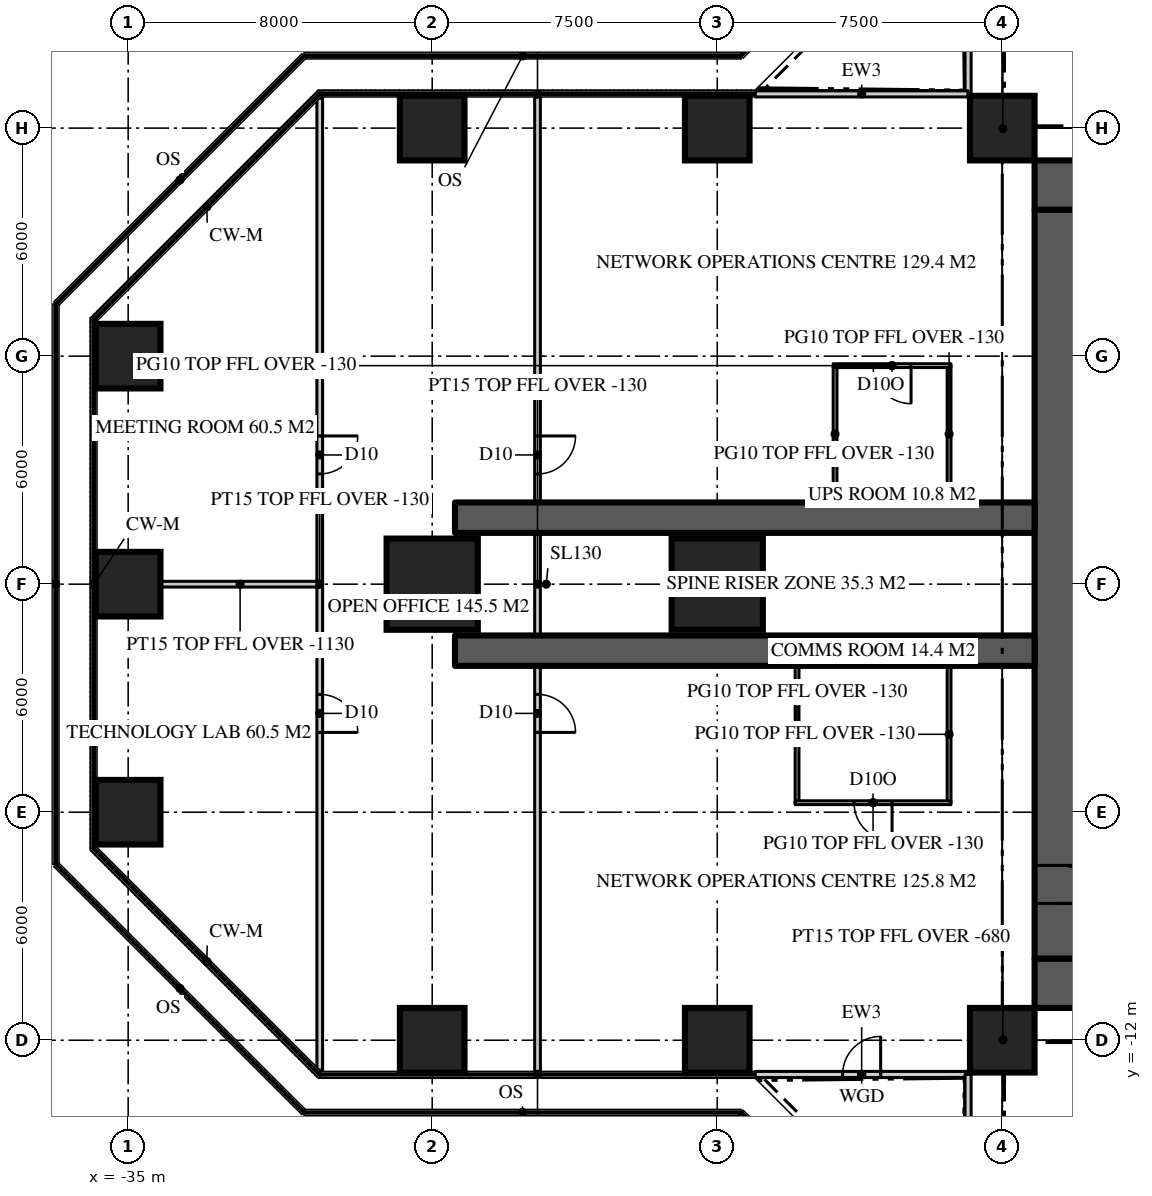
"""IFC4 building model, lengths in metres.
Left out: names, types, materials, properties, quantities, classifications, styles, units other than length and angle.
Written with IfcOpenShell. Run it as: python <this file> out.ifc"""

import sys

from ifc_helpers import new_model, si_unit, direction, frame, frame_2d, origin, origin_2d, place, context, subcontext, project, spatial, rectangle, extrude, element, fill, save


model = new_model("IFC4")
c1 = context("Model", 3, precision=1e-05, world=origin(), true_north=direction((0.0, 1.0)))
c2 = subcontext(c1, "Body", "Model", "MODEL_VIEW")
j1 = project(units=[si_unit("LENGTHUNIT", "METRE"), si_unit("PLANEANGLEUNIT", "RADIAN")], contexts=[c1])
p1 = place(None, origin())
s1 = spatial("IfcSite", under=j1, at=p1, CompositionType="ELEMENT")
p2 = place(p1, origin())
s2 = spatial("IfcBuilding", under=s1, at=p2, CompositionType="ELEMENT")
p3 = place(p2, frame((0.0, 0.0, 151.5)))
s3 = spatial("IfcBuildingStorey", under=s2, at=p3, CompositionType="ELEMENT", Elevation=151.5)
p4 = place(p3, frame((-11.15, 10.5, 0.0), z_axis=(0.0, 0.0, 1.0), x_axis=(1.0, 0.0, 0.0)))
e1 = element("IfcWall", 1, at=p4, inside=s3, PredefinedType="SHEAR", context=c2, shape_type="SweptSolid", body=[
    extrude(rectangle(XDim=22.3, YDim=1.3, at=frame_2d((11.15, 0.0))), origin(), (0.0, 0.0, 1.0), 3.9),
])
p5 = place(p4, frame((4.25, 0.0, 0.0)))
e2 = element("IfcOpeningElement", 2, at=p5, cuts=e1, PredefinedType="OPENING", context=c2, shape_type="SweptSolid", body=[
    extrude(rectangle(XDim=1.8, YDim=2.2, at=frame_2d((0.9, 1.1))), frame((0.0, 0.66, 0.0), z_axis=(0.0, -1.0, 0.0), x_axis=(1.0, 0.0, 0.0)), (0.0, 0.0, 1.0), 1.32),
])
p6 = place(p4, frame((16.25, 0.0, 0.0)))
e3 = element("IfcOpeningElement", 3, at=p6, cuts=e1, PredefinedType="OPENING", context=c2, shape_type="SweptSolid", body=[
    extrude(rectangle(XDim=1.8, YDim=2.2, at=frame_2d((0.9, 1.1))), frame((0.0, 0.66, 0.0), z_axis=(0.0, -1.0, 0.0), x_axis=(1.0, 0.0, 0.0)), (0.0, 0.0, 1.0), 1.32),
])
p7 = place(p3, frame((11.15, -10.5, 0.0), z_axis=(0.0, 0.0, 1.0), x_axis=(-1.0, 0.0, 0.0)))
e4 = element("IfcWall", 4, at=p7, inside=s3, PredefinedType="SHEAR", context=c2, shape_type="SweptSolid", body=[
    extrude(rectangle(XDim=22.3, YDim=1.3, at=frame_2d((11.15, 0.0))), origin(), (0.0, 0.0, 1.0), 3.9),
])
p8 = place(p7, frame((16.25, 0.0, 0.0)))
e5 = element("IfcOpeningElement", 5, at=p8, cuts=e4, PredefinedType="OPENING", context=c2, shape_type="SweptSolid", body=[
    extrude(rectangle(XDim=1.8, YDim=2.2, at=frame_2d((0.9, 1.1))), frame((0.0, 0.66, 0.0), z_axis=(0.0, -1.0, 0.0), x_axis=(1.0, 0.0, 0.0)), (0.0, 0.0, 1.0), 1.32),
])
p9 = place(p7, frame((4.25, 0.0, 0.0)))
e6 = element("IfcOpeningElement", 6, at=p9, cuts=e4, PredefinedType="OPENING", context=c2, shape_type="SweptSolid", body=[
    extrude(rectangle(XDim=1.8, YDim=2.2, at=frame_2d((0.9, 1.1))), frame((0.0, 0.66, 0.0), z_axis=(0.0, -1.0, 0.0), x_axis=(1.0, 0.0, 0.0)), (0.0, 0.0, 1.0), 1.32),
])
p10 = place(p3, frame((-10.5, 9.85, 0.0), z_axis=(0.0, 0.0, 1.0), x_axis=(0.0, -1.0, 0.0)))
e7 = element("IfcWall", 7, at=p10, inside=s3, PredefinedType="SHEAR", context=c2, shape_type="SweptSolid", body=[
    extrude(rectangle(XDim=19.7, YDim=1.3, at=frame_2d((9.85, 0.0))), origin(), (0.0, 0.0, 1.0), 3.9),
])
p11 = place(p10, frame((17.25, 0.0, 0.0)))
e8 = element("IfcOpeningElement", 8, at=p11, cuts=e7, PredefinedType="OPENING", context=c2, shape_type="SweptSolid", body=[
    extrude(rectangle(XDim=1.0, YDim=2.2, at=frame_2d((0.5, 1.1))), frame((0.0, 0.66, 0.0), z_axis=(0.0, -1.0, 0.0), x_axis=(1.0, 0.0, 0.0)), (0.0, 0.0, 1.0), 1.32),
])
for number, where, z_axis, x_axis in (
    (9, (-11.15, 1.75, 0.0), (0.0, 0.0, 1.0), (-1.0, 0.0, 0.0)),
    (10, (-11.15, -1.75, 0.0), (0.0, 0.0, 1.0), (-1.0, 0.0, 0.0)),
):
    element("IfcWall", number, at=place(p3, frame(where, z_axis=z_axis, x_axis=x_axis)), inside=s3, PredefinedType="SHEAR", context=c2, shape_type="SweptSolid", body=[
        extrude(rectangle(XDim=15.25, YDim=0.8, at=frame_2d((7.625, 0.0))), origin(), (0.0, 0.0, 1.0), 3.9),
    ])
for number, where, z_axis, x_axis in (
    (11, (-27.0, -12.0, 0.0), (0.0, 0.0, 1.0), (1.0, 0.0, 0.0)),
    (12, (-19.5, -12.0, 0.0), (0.0, 0.0, 1.0), (1.0, 0.0, 0.0)),
    (13, (-12.0, -12.0, 0.0), (0.0, 0.0, 1.0), (1.0, 0.0, 0.0)),
    (14, (-35.0, -6.0, 0.0), (0.0, 0.0, 1.0), (1.0, 0.0, 0.0)),
    (15, (-35.0, 0.0, 0.0), (0.0, 0.0, 1.0), (1.0, 0.0, 0.0)),
):
    element("IfcColumn", number, at=place(p3, frame(where, z_axis=z_axis, x_axis=x_axis)), inside=s3, PredefinedType="COLUMN", context=c2, shape_type="SweptSolid", body=[
        extrude(rectangle(XDim=1.7, YDim=1.7, at=origin_2d()), origin(), (0.0, 0.0, 1.0), 3.9),
    ])
for number, where, z_axis, x_axis in (
    (16, (-27.0, 0.0, 0.0), (0.0, 0.0, 1.0), (1.0, 0.0, 0.0)),
    (17, (-19.5, 0.0, 0.0), (0.0, 0.0, 1.0), (1.0, 0.0, 0.0)),
):
    element("IfcColumn", number, at=place(p3, frame(where, z_axis=z_axis, x_axis=x_axis)), inside=s3, PredefinedType="COLUMN", context=c2, shape_type="SweptSolid", body=[
        extrude(rectangle(XDim=2.4, YDim=2.4, at=origin_2d()), origin(), (0.0, 0.0, 1.0), 3.9),
    ])
for number, where, z_axis, x_axis in (
    (18, (-35.0, 6.0, 0.0), (0.0, 0.0, 1.0), (1.0, 0.0, 0.0)),
    (19, (-27.0, 12.0, 0.0), (0.0, 0.0, 1.0), (1.0, 0.0, 0.0)),
    (20, (-19.5, 12.0, 0.0), (0.0, 0.0, 1.0), (1.0, 0.0, 0.0)),
    (21, (-12.0, 12.0, 0.0), (0.0, 0.0, 1.0), (1.0, 0.0, 0.0)),
):
    element("IfcColumn", number, at=place(p3, frame(where, z_axis=z_axis, x_axis=x_axis)), inside=s3, PredefinedType="COLUMN", context=c2, shape_type="SweptSolid", body=[
        extrude(rectangle(XDim=1.7, YDim=1.7, at=origin_2d()), origin(), (0.0, 0.0, 1.0), 3.9),
    ])
p12 = place(p3, frame((-12.9, 18.5, 0.0), z_axis=(0.0, 0.0, 1.0), x_axis=(0.0, -1.0, 0.0)))
e22 = element("IfcWall", 22, at=p12, inside=s3, PredefinedType="SOLIDWALL", context=c2, shape_type="SweptSolid", body=[
    extrude(rectangle(XDim=5.6, YDim=0.16, at=frame_2d((2.8, 0.0))), origin(), (0.0, 0.0, 1.0), 3.77),
])
p13 = place(p12, frame((2.3, 0.0, 0.0)))
e23 = element("IfcOpeningElement", 23, at=p13, cuts=e22, PredefinedType="OPENING", context=c2, shape_type="SweptSolid", body=[
    extrude(rectangle(XDim=1.0, YDim=2.2, at=frame_2d((0.5, 1.1))), frame((0.0, 0.09, 0.0), z_axis=(0.0, -1.0, 0.0), x_axis=(1.0, 0.0, 0.0)), (0.0, 0.0, 1.0), 0.18),
])
p14 = place(p3, frame((-12.9, 12.9, 0.0), z_axis=(0.0, 0.0, 1.0), x_axis=(-1.0, 0.0, 0.0)))
e24 = element("IfcWall", 24, at=p14, inside=s3, PredefinedType="SOLIDWALL", context=c2, shape_type="SweptSolid", body=[
    extrude(rectangle(XDim=5.6, YDim=0.16, at=frame_2d((2.8, 0.0))), origin(), (0.0, 0.0, 1.0), 3.77),
])
p15 = place(p3, frame((-18.5, -12.9, 0.0), z_axis=(0.0, 0.0, 1.0), x_axis=(1.0, 0.0, 0.0)))
e25 = element("IfcWall", 25, at=p15, inside=s3, PredefinedType="SOLIDWALL", context=c2, shape_type="SweptSolid", body=[
    extrude(rectangle(XDim=5.6, YDim=0.16, at=frame_2d((2.8, 0.0))), origin(), (0.0, 0.0, 1.0), 3.77),
])
p16 = place(p15, frame((2.3, 0.0, 0.0)))
e26 = element("IfcOpeningElement", 26, at=p16, cuts=e25, PredefinedType="OPENING", context=c2, shape_type="SweptSolid", body=[
    extrude(rectangle(XDim=1.0, YDim=2.2, at=frame_2d((0.5, 1.1))), frame((0.0, 0.09, 0.0), z_axis=(0.0, -1.0, 0.0), x_axis=(1.0, 0.0, 0.0)), (0.0, 0.0, 1.0), 0.18),
])
p17 = place(p3, frame((-12.9, -12.9, 0.0), z_axis=(0.0, 0.0, 1.0), x_axis=(0.0, -1.0, 0.0)))
e27 = element("IfcWall", 27, at=p17, inside=s3, PredefinedType="SOLIDWALL", context=c2, shape_type="SweptSolid", body=[
    extrude(rectangle(XDim=5.6, YDim=0.16, at=frame_2d((2.8, 0.0))), origin(), (0.0, 0.0, 1.0), 3.77),
])
p18 = place(p3, frame((-24.229, 12.82, 0.0), z_axis=(0.0, 0.0, 1.0), x_axis=(0.0, -1.0, 0.0)))
e28 = element("IfcWall", 28, at=p18, inside=s3, PredefinedType="PARTITIONING", context=c2, shape_type="SweptSolid", body=[
    extrude(rectangle(XDim=25.64, YDim=0.15, at=frame_2d((12.82, 0.0))), origin(), (0.0, 0.0, 1.0), 3.77),
])
p19 = place(p18, frame((15.72, 0.0, 0.0)))
e29 = element("IfcOpeningElement", 29, at=p19, cuts=e28, PredefinedType="OPENING", context=c2, shape_type="SweptSolid", body=[
    extrude(rectangle(XDim=1.0, YDim=2.2, at=frame_2d((0.5, 1.1))), frame((0.0, 0.085, 0.0), z_axis=(0.0, -1.0, 0.0), x_axis=(1.0, 0.0, 0.0)), (0.0, 0.0, 1.0), 0.17),
])
p20 = place(p18, frame((8.92, 0.0, 0.0)))
e30 = element("IfcOpeningElement", 30, at=p20, cuts=e28, PredefinedType="OPENING", context=c2, shape_type="SweptSolid", body=[
    extrude(rectangle(XDim=1.0, YDim=2.2, at=frame_2d((0.5, 1.1))), frame((0.0, 0.085, 0.0), z_axis=(0.0, -1.0, 0.0), x_axis=(1.0, 0.0, 0.0)), (0.0, 0.0, 1.0), 0.17),
])
p21 = place(p3, frame((-29.959, 12.786, 0.0), z_axis=(0.0, 0.0, 1.0), x_axis=(0.0, -1.0, 0.0)))
e31 = element("IfcWall", 31, at=p21, inside=s3, PredefinedType="PARTITIONING", context=c2, shape_type="SweptSolid", body=[
    extrude(rectangle(XDim=25.573, YDim=0.15, at=frame_2d((12.786, 0.0))), origin(), (0.0, 0.0, 1.0), 3.77),
])
p22 = place(p21, frame((15.687, 0.0, 0.0)))
e32 = element("IfcOpeningElement", 32, at=p22, cuts=e31, PredefinedType="OPENING", context=c2, shape_type="SweptSolid", body=[
    extrude(rectangle(XDim=1.0, YDim=2.2, at=frame_2d((0.5, 1.1))), frame((0.0, 0.085, 0.0), z_axis=(0.0, -1.0, 0.0), x_axis=(1.0, 0.0, 0.0)), (0.0, 0.0, 1.0), 0.17),
])
p23 = place(p21, frame((8.886, 0.0, 0.0)))
e33 = element("IfcOpeningElement", 33, at=p23, cuts=e31, PredefinedType="OPENING", context=c2, shape_type="SweptSolid", body=[
    extrude(rectangle(XDim=1.0, YDim=2.2, at=frame_2d((0.5, 1.1))), frame((0.0, 0.085, 0.0), z_axis=(0.0, -1.0, 0.0), x_axis=(1.0, 0.0, 0.0)), (0.0, 0.0, 1.0), 0.17),
])
p24 = place(p3, frame((-29.959, 0.0, 0.0), z_axis=(0.0, 0.0, 1.0), x_axis=(-1.0, 0.0, 0.0)))
e34 = element("IfcWall", 34, at=p24, inside=s3, PredefinedType="PARTITIONING", context=c2, shape_type="SweptSolid", body=[
    extrude(rectangle(XDim=4.191, YDim=0.15, at=frame_2d((2.095, 0.0))), origin(), (0.0, 0.0, 1.0), 2.77),
])
for number, where, z_axis, x_axis in (
    (35, (-13.4, -2.15, 0.0), (0.0, 0.0, 1.0), (0.0, -1.0, 0.0)),
    (36, (-17.4, -2.15, 0.0), (0.0, 0.0, 1.0), (0.0, -1.0, 0.0)),
):
    element("IfcWall", number, at=place(p3, frame(where, z_axis=z_axis, x_axis=x_axis)), inside=s3, PredefinedType="PARTITIONING", context=c2, shape_type="SweptSolid", body=[
        extrude(rectangle(XDim=3.6, YDim=0.1, at=frame_2d((1.8, 0.0))), origin(), (0.0, 0.0, 1.0), 3.77),
    ])
p25 = place(p3, frame((-13.35, -5.75, 0.0), z_axis=(0.0, 0.0, 1.0), x_axis=(-1.0, 0.0, 0.0)))
e37 = element("IfcWall", 37, at=p25, inside=s3, PredefinedType="PARTITIONING", context=c2, shape_type="SweptSolid", body=[
    extrude(rectangle(XDim=4.1, YDim=0.1, at=frame_2d((2.05, 0.0))), origin(), (0.0, 0.0, 1.0), 3.77),
])
p26 = place(p25, frame((1.55, 0.0, 0.0)))
e38 = element("IfcOpeningElement", 38, at=p26, cuts=e37, PredefinedType="OPENING", context=c2, shape_type="SweptSolid", body=[
    extrude(rectangle(XDim=1.0, YDim=2.2, at=frame_2d((0.5, 1.1))), frame((0.0, 0.06, 0.0), z_axis=(0.0, -1.0, 0.0), x_axis=(1.0, 0.0, 0.0)), (0.0, 0.0, 1.0), 0.12),
])
for number, where, z_axis, x_axis in (
    (39, (-13.4, 2.15, 0.0), (0.0, 0.0, 1.0), (0.0, 1.0, 0.0)),
    (40, (-16.4, 2.15, 0.0), (0.0, 0.0, 1.0), (0.0, 1.0, 0.0)),
):
    element("IfcWall", number, at=place(p3, frame(where, z_axis=z_axis, x_axis=x_axis)), inside=s3, PredefinedType="PARTITIONING", context=c2, shape_type="SweptSolid", body=[
        extrude(rectangle(XDim=3.6, YDim=0.1, at=frame_2d((1.8, 0.0))), origin(), (0.0, 0.0, 1.0), 3.77),
    ])
p27 = place(p3, frame((-13.35, 5.75, 0.0), z_axis=(0.0, 0.0, 1.0), x_axis=(-1.0, 0.0, 0.0)))
e41 = element("IfcWall", 41, at=p27, inside=s3, PredefinedType="PARTITIONING", context=c2, shape_type="SweptSolid", body=[
    extrude(rectangle(XDim=3.1, YDim=0.1, at=frame_2d((1.55, 0.0))), origin(), (0.0, 0.0, 1.0), 3.77),
])
p28 = place(p27, frame((1.05, 0.0, 0.0)))
e42 = element("IfcOpeningElement", 42, at=p28, cuts=e41, PredefinedType="OPENING", context=c2, shape_type="SweptSolid", body=[
    extrude(rectangle(XDim=1.0, YDim=2.2, at=frame_2d((0.5, 1.1))), frame((0.0, 0.06, 0.0), z_axis=(0.0, -1.0, 0.0), x_axis=(1.0, 0.0, 0.0)), (0.0, 0.0, 1.0), 0.12),
])
for number, where, z_axis, x_axis in (
    (43, (-11.15, 11.15, 0.0), (0.0, 0.0, 1.0), (-0.707, 0.707, 0.0)),
    (44, (-11.15, -11.15, 0.0), (0.0, 0.0, 1.0), (-0.707, -0.707, 0.0)),
):
    element("IfcWall", number, at=place(p3, frame(where, z_axis=z_axis, x_axis=x_axis)), inside=s3, PredefinedType="PARTITIONING", context=c2, shape_type="SweptSolid", body=[
        extrude(rectangle(XDim=2.362, YDim=0.15, at=frame_2d((1.181, 0.0))), origin(), (0.0, 0.0, 1.0), 3.22),
    ])
p29 = place(p16, origin())
e45 = element("IfcDoor", 45, at=p29, inside=s3, OperationType="SINGLE_SWING_RIGHT", PredefinedType="DOOR", context=c2, shape_type="SweptSolid", body=[
    extrude(rectangle(XDim=1.0, YDim=2.2, at=frame_2d((0.5, 1.1))), frame((0.0, 0.025, 0.0), z_axis=(0.0, -1.0, 0.0), x_axis=(1.0, 0.0, 0.0)), (0.0, 0.0, 1.0), 0.05),
])
fill(e26, e45)
p30 = place(p11, origin())
e46 = element("IfcDoor", 46, at=p30, inside=s3, OperationType="SINGLE_SWING_RIGHT", PredefinedType="DOOR", context=c2, shape_type="SweptSolid", body=[
    extrude(rectangle(XDim=1.0, YDim=2.2, at=frame_2d((0.5, 1.1))), frame((0.0, 0.025, 0.0), z_axis=(0.0, -1.0, 0.0), x_axis=(1.0, 0.0, 0.0)), (0.0, 0.0, 1.0), 0.05),
])
fill(e8, e46)
p31 = place(p19, origin())
e47 = element("IfcDoor", 47, at=p31, inside=s3, OperationType="SINGLE_SWING_RIGHT", PredefinedType="DOOR", context=c2, shape_type="SweptSolid", body=[
    extrude(rectangle(XDim=1.0, YDim=2.2, at=frame_2d((0.5, 1.1))), frame((0.0, 0.025, 0.0), z_axis=(0.0, -1.0, 0.0), x_axis=(1.0, 0.0, 0.0)), (0.0, 0.0, 1.0), 0.05),
])
fill(e29, e47)
p32 = place(p20, origin())
e48 = element("IfcDoor", 48, at=p32, inside=s3, OperationType="SINGLE_SWING_LEFT", PredefinedType="DOOR", context=c2, shape_type="SweptSolid", body=[
    extrude(rectangle(XDim=1.0, YDim=2.2, at=frame_2d((0.5, 1.1))), frame((0.0, 0.025, 0.0), z_axis=(0.0, -1.0, 0.0), x_axis=(1.0, 0.0, 0.0)), (0.0, 0.0, 1.0), 0.05),
])
fill(e30, e48)
p33 = place(p22, origin())
e49 = element("IfcDoor", 49, at=p33, inside=s3, OperationType="SINGLE_SWING_RIGHT", PredefinedType="DOOR", context=c2, shape_type="SweptSolid", body=[
    extrude(rectangle(XDim=1.0, YDim=2.2, at=frame_2d((0.5, 1.1))), frame((0.0, 0.025, 0.0), z_axis=(0.0, -1.0, 0.0), x_axis=(1.0, 0.0, 0.0)), (0.0, 0.0, 1.0), 0.05),
])
fill(e32, e49)
p34 = place(p23, origin())
e50 = element("IfcDoor", 50, at=p34, inside=s3, OperationType="SINGLE_SWING_LEFT", PredefinedType="DOOR", context=c2, shape_type="SweptSolid", body=[
    extrude(rectangle(XDim=1.0, YDim=2.2, at=frame_2d((0.5, 1.1))), frame((0.0, 0.025, 0.0), z_axis=(0.0, -1.0, 0.0), x_axis=(1.0, 0.0, 0.0)), (0.0, 0.0, 1.0), 0.05),
])
fill(e33, e50)
p35 = place(p26, origin())
e51 = element("IfcDoor", 51, at=p35, inside=s3, OperationType="SINGLE_SWING_LEFT", PredefinedType="DOOR", context=c2, shape_type="SweptSolid", body=[
    extrude(rectangle(XDim=1.0, YDim=2.2, at=frame_2d((0.5, 1.1))), frame((0.0, 0.025, 0.0), z_axis=(0.0, -1.0, 0.0), x_axis=(1.0, 0.0, 0.0)), (0.0, 0.0, 1.0), 0.05),
])
fill(e38, e51)
p36 = place(p28, origin())
e52 = element("IfcDoor", 52, at=p36, inside=s3, OperationType="SINGLE_SWING_LEFT", PredefinedType="DOOR", context=c2, shape_type="SweptSolid", body=[
    extrude(rectangle(XDim=1.0, YDim=2.2, at=frame_2d((0.5, 1.1))), frame((0.0, 0.025, 0.0), z_axis=(0.0, -1.0, 0.0), x_axis=(1.0, 0.0, 0.0)), (0.0, 0.0, 1.0), 0.05),
])
fill(e42, e52)
save(model, sys.argv[1])
